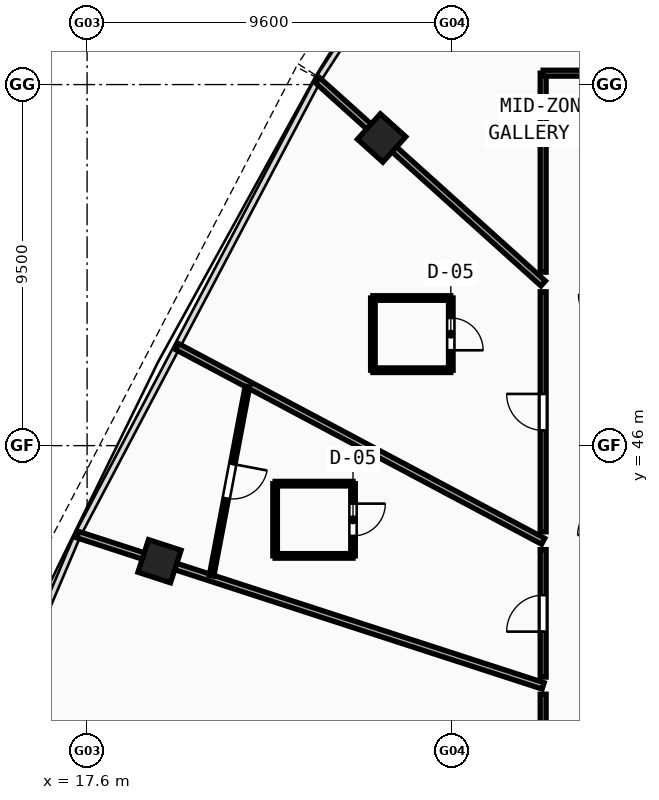
"""IFC4 building model, lengths in metres.
Left out: names, types, materials, properties, quantities, classifications, styles, units other than length and angle.
Written with IfcOpenShell. Run it as: python <this file> out.ifc"""

import sys

from ifc_helpers import new_model, si_unit, direction, frame, frame_2d, origin, origin_with_axes, origin_2d, place, context, subcontext, project, spatial, rectangle, hollow_rectangle, extrude, source, transform, mapped, element, fill, save


model = new_model("IFC4")
c1 = context("Model", 3, precision=1e-05, world=origin(), true_north=direction((0.0, 1.0)))
c2 = subcontext(c1, "Body", "Model", "MODEL_VIEW")
j1 = project(units=[si_unit("LENGTHUNIT", "METRE"), si_unit("PLANEANGLEUNIT", "RADIAN")], contexts=[c1])
p1 = place(None, origin())
s1 = spatial("IfcSite", under=j1, at=p1, CompositionType="ELEMENT")
p2 = place(p1, origin())
s2 = spatial("IfcBuilding", under=s1, at=p2, CompositionType="ELEMENT")
p3 = place(p2, frame((0.0, 0.0, 184.76)))
s3 = spatial("IfcBuildingStorey", under=s2, at=p3, CompositionType="ELEMENT", Elevation=184.76)
m1 = source(origin(), c2, "Body", "SweptSolid", [
    extrude(hollow_rectangle(XDim=0.9, YDim=0.9, WallThickness=0.036, at=origin_2d()), origin(), (0.0, 0.0, 1.0), 3.8),
])
for number, where, z_axis, x_axis in (
    (1, (25.349, 54.095, -0.26), (0.0, 0.0, 1.0), (-0.669, -0.743, 0.0)),
    (2, (19.505, 42.958, -0.26), (0.0, 0.0, 1.0), (-0.309, -0.951, 0.0)),
):
    element("IfcColumn", number, at=place(p3, frame(where, z_axis=z_axis, x_axis=x_axis)), inside=s3, PredefinedType="COLUMN", context=c2, shape_type="MappedRepresentation", body=[
        mapped(m1, transform((0.0, 0.0, 0.0), scale=1.0)),
    ])
p4 = place(p3, frame((29.6, 50.267, 0.0), z_axis=(0.0, 0.0, 1.0), x_axis=(-0.743139097079, 0.669136968335, 0.0)))
e3 = element("IfcWall", 3, at=p4, inside=s3, PredefinedType="PARTITIONING", context=c2, shape_type="SweptSolid", body=[
    extrude(rectangle(XDim=7.987, YDim=0.175, at=frame_2d((3.994, 0.0))), origin(), (0.0, 0.0, 1.0), 2.89),
])
p5 = place(p3, frame((29.6, 43.483, 0.0), z_axis=(0.0, 0.0, 1.0), x_axis=(-0.882940086537, 0.469485679853, 0.0)))
e4 = element("IfcWall", 4, at=p5, inside=s3, PredefinedType="PARTITIONING", context=c2, shape_type="SweptSolid", body=[
    extrude(rectangle(XDim=10.91, YDim=0.175, at=frame_2d((5.455, 0.0))), origin(), (0.0, 0.0, 1.0), 2.89),
])
p6 = place(p3, frame((29.6, 39.678, 0.0), z_axis=(0.0, 0.0, 1.0), x_axis=(-0.951054689993, 0.309022615097, 0.0)))
e5 = element("IfcWall", 5, at=p6, inside=s3, PredefinedType="PARTITIONING", context=c2, shape_type="SweptSolid", body=[
    extrude(rectangle(XDim=12.875, YDim=0.175, at=frame_2d((6.438, 0.0))), origin(), (0.0, 0.0, 1.0), 2.89),
])
p7 = place(p3, frame((29.6, 21.8, 0.0), z_axis=(0.0, 0.0, 1.0), x_axis=(0.0, 1.0, 0.0)))
e6 = element("IfcWall", 6, at=p7, inside=s3, PredefinedType="PARTITIONING", context=c2, shape_type="SweptSolid", body=[
    extrude(rectangle(XDim=17.659, YDim=0.155, at=frame_2d((8.829, 0.0))), origin(), (0.0, 0.0, 1.0), 2.89),
])
p8 = place(p7, frame((8.234, 0.0, 0.0)))
e7 = element("IfcOpeningElement", 7, at=p8, cuts=e6, PredefinedType="OPENING", context=c2, shape_type="SweptSolid", body=[
    extrude(rectangle(XDim=0.96, YDim=2.12, at=frame_2d((0.48, 1.06))), frame((0.0, 0.087, 0.0), z_axis=(0.0, -1.0, 0.0), x_axis=(1.0, 0.0, 0.0)), (0.0, 0.0, 1.0), 0.175),
])
p9 = place(p3, frame((29.6, 39.91, 0.0), z_axis=(0.0, 0.0, 1.0), x_axis=(0.0, 1.0, 0.0)))
e8 = element("IfcWall", 8, at=p9, inside=s3, PredefinedType="PARTITIONING", context=c2, shape_type="SweptSolid", body=[
    extrude(rectangle(XDim=3.354, YDim=0.155, at=frame_2d((1.677, 0.0))), origin(), (0.0, 0.0, 1.0), 3.54),
])
p10 = place(p9, frame((1.196, 0.0, 0.0)))
e9 = element("IfcOpeningElement", 9, at=p10, cuts=e8, PredefinedType="OPENING", context=c2, shape_type="SweptSolid", body=[
    extrude(rectangle(XDim=0.96, YDim=2.12, at=frame_2d((0.48, 1.06))), frame((0.0, 0.087, 0.0), z_axis=(0.0, -1.0, 0.0), x_axis=(1.0, 0.0, 0.0)), (0.0, 0.0, 1.0), 0.175),
])
p11 = place(p3, frame((29.6, 43.733, 0.0), z_axis=(0.0, 0.0, 1.0), x_axis=(0.0, 1.0, 0.0)))
e10 = element("IfcWall", 10, at=p11, inside=s3, PredefinedType="PARTITIONING", context=c2, shape_type="SweptSolid", body=[
    extrude(rectangle(XDim=6.315, YDim=0.155, at=frame_2d((3.157, 0.0))), origin(), (0.0, 0.0, 1.0), 2.89),
])
p12 = place(p11, frame((2.668, 0.0, 0.0)))
e11 = element("IfcOpeningElement", 11, at=p12, cuts=e10, PredefinedType="OPENING", context=c2, shape_type="SweptSolid", body=[
    extrude(rectangle(XDim=0.96, YDim=2.12, at=frame_2d((0.48, 1.06))), frame((0.0, 0.087, 0.0), z_axis=(0.0, -1.0, 0.0), x_axis=(1.0, 0.0, 0.0)), (0.0, 0.0, 1.0), 0.175),
])
p13 = place(p3, frame((29.6, 50.563, 0.0), z_axis=(0.0, 0.0, 1.0), x_axis=(0.0, 1.0, 0.0)))
e12 = element("IfcWall", 12, at=p13, inside=s3, PredefinedType="PARTITIONING", context=c2, shape_type="SweptSolid", body=[
    extrude(rectangle(XDim=5.237, YDim=0.155, at=frame_2d((2.618, 0.0))), origin(), (0.0, 0.0, 1.0), 3.54),
])
p14 = place(p3, frame((29.6, 55.8, 0.0), z_axis=(0.0, 0.0, 1.0), x_axis=(1.0, 0.0, 0.0)))
e13 = element("IfcWall", 13, at=p14, inside=s3, PredefinedType="PARTITIONING", context=c2, shape_type="SweptSolid", body=[
    extrude(rectangle(XDim=14.109, YDim=0.155, at=frame_2d((7.054, 0.0))), origin(), (0.0, 0.0, 1.0), 2.89),
])
p15 = place(p14, frame((6.385, 0.0, 0.0)))
e14 = element("IfcOpeningElement", 14, at=p15, cuts=e13, PredefinedType="OPENING", context=c2, shape_type="SweptSolid", body=[
    extrude(rectangle(XDim=0.96, YDim=2.12, at=frame_2d((0.48, 1.06))), frame((0.0, 0.087, 0.0), z_axis=(0.0, -1.0, 0.0), x_axis=(1.0, 0.0, 0.0)), (0.0, 0.0, 1.0), 0.175),
])
p16 = place(p3, frame((25.12, 47.984, 0.0), z_axis=(0.0, 0.0, 1.0), x_axis=(1.0, 0.0, 0.0)))
e15 = element("IfcWall", 15, at=p16, inside=s3, PredefinedType="PARTITIONING", context=c2, shape_type="SweptSolid", body=[
    extrude(rectangle(XDim=2.05, YDim=0.12, at=frame_2d((1.025, 0.0))), origin(), (0.0, 0.0, 1.0), 3.54),
])
p17 = place(p3, frame((27.17, 47.984, 0.0), z_axis=(0.0, 0.0, 1.0), x_axis=(0.0, 1.0, 0.0)))
e16 = element("IfcWall", 16, at=p17, inside=s3, PredefinedType="PARTITIONING", context=c2, shape_type="SweptSolid", body=[
    extrude(rectangle(XDim=1.9, YDim=0.12, at=frame_2d((0.95, 0.0))), origin(), (0.0, 0.0, 1.0), 3.54),
])
p18 = place(p17, frame((0.525, 0.0, 0.0)))
e17 = element("IfcOpeningElement", 17, at=p18, cuts=e16, PredefinedType="OPENING", context=c2, shape_type="SweptSolid", body=[
    extrude(rectangle(XDim=0.85, YDim=2.1, at=frame_2d((0.425, 1.05))), frame((0.0, 0.07, 0.0), z_axis=(0.0, -1.0, 0.0), x_axis=(1.0, 0.0, 0.0)), (0.0, 0.0, 1.0), 0.14),
])
p19 = place(p3, frame((27.17, 49.884, 0.0), z_axis=(0.0, 0.0, 1.0), x_axis=(-1.0, 0.0, 0.0)))
e18 = element("IfcWall", 18, at=p19, inside=s3, PredefinedType="PARTITIONING", context=c2, shape_type="SweptSolid", body=[
    extrude(rectangle(XDim=2.05, YDim=0.12, at=frame_2d((1.025, 0.0))), origin(), (0.0, 0.0, 1.0), 3.54),
])
p20 = place(p3, frame((25.12, 49.884, 0.0), z_axis=(0.0, 0.0, 1.0), x_axis=(0.0, -1.0, 0.0)))
e19 = element("IfcWall", 19, at=p20, inside=s3, PredefinedType="PARTITIONING", context=c2, shape_type="SweptSolid", body=[
    extrude(rectangle(XDim=1.9, YDim=0.12, at=frame_2d((0.95, 0.0))), origin(), (0.0, 0.0, 1.0), 3.54),
])
p21 = place(p3, frame((22.547, 43.099, 0.0), z_axis=(0.0, 0.0, 1.0), x_axis=(1.0, 0.0, 0.0)))
e20 = element("IfcWall", 20, at=p21, inside=s3, PredefinedType="PARTITIONING", context=c2, shape_type="SweptSolid", body=[
    extrude(rectangle(XDim=2.05, YDim=0.12, at=frame_2d((1.025, 0.0))), origin(), (0.0, 0.0, 1.0), 3.54),
])
p22 = place(p3, frame((24.597, 43.099, 0.0), z_axis=(0.0, 0.0, 1.0), x_axis=(0.0, 1.0, 0.0)))
e21 = element("IfcWall", 21, at=p22, inside=s3, PredefinedType="PARTITIONING", context=c2, shape_type="SweptSolid", body=[
    extrude(rectangle(XDim=1.9, YDim=0.12, at=frame_2d((0.95, 0.0))), origin(), (0.0, 0.0, 1.0), 3.54),
])
p23 = place(p22, frame((0.525, 0.0, 0.0)))
e22 = element("IfcOpeningElement", 22, at=p23, cuts=e21, PredefinedType="OPENING", context=c2, shape_type="SweptSolid", body=[
    extrude(rectangle(XDim=0.85, YDim=2.1, at=frame_2d((0.425, 1.05))), frame((0.0, 0.07, 0.0), z_axis=(0.0, -1.0, 0.0), x_axis=(1.0, 0.0, 0.0)), (0.0, 0.0, 1.0), 0.14),
])
p24 = place(p3, frame((24.597, 44.999, 0.0), z_axis=(0.0, 0.0, 1.0), x_axis=(-1.0, 0.0, 0.0)))
e23 = element("IfcWall", 23, at=p24, inside=s3, PredefinedType="PARTITIONING", context=c2, shape_type="SweptSolid", body=[
    extrude(rectangle(XDim=2.05, YDim=0.12, at=frame_2d((1.025, 0.0))), origin(), (0.0, 0.0, 1.0), 3.54),
])
p25 = place(p3, frame((22.547, 44.999, 0.0), z_axis=(0.0, 0.0, 1.0), x_axis=(0.0, -1.0, 0.0)))
e24 = element("IfcWall", 24, at=p25, inside=s3, PredefinedType="PARTITIONING", context=c2, shape_type="SweptSolid", body=[
    extrude(rectangle(XDim=1.9, YDim=0.12, at=frame_2d((0.95, 0.0))), origin(), (0.0, 0.0, 1.0), 3.54),
])
p26 = place(p3, frame((21.818, 47.553, 0.0), z_axis=(0.0, 0.0, 1.0), x_axis=(-0.186234987185, -0.982505231308, 0.0)))
e25 = element("IfcWall", 25, at=p26, inside=s3, PredefinedType="PARTITIONING", context=c2, shape_type="SweptSolid", body=[
    extrude(rectangle(XDim=5.065, YDim=0.12, at=frame_2d((2.533, 0.0))), origin(), (0.0, 0.0, 1.0), 2.89),
])
p27 = place(p26, frame((2.073, 0.0, 0.0)))
e26 = element("IfcOpeningElement", 26, at=p27, cuts=e25, PredefinedType="OPENING", context=c2, shape_type="SweptSolid", body=[
    extrude(rectangle(XDim=0.92, YDim=2.1, at=frame_2d((0.46, 1.05))), frame((0.0, 0.07, 0.0), z_axis=(0.0, -1.0, 0.0), x_axis=(1.0, 0.0, 0.0)), (0.0, 0.0, 1.0), 0.14),
])
m2 = source(origin(), c2, "Body", "SweptSolid", [
    extrude(rectangle(XDim=0.96, YDim=2.12, at=frame_2d((0.48, 1.06))), frame((0.0, 0.025, 0.0), z_axis=(0.0, -1.0, 0.0), x_axis=(1.0, 0.0, 0.0)), (0.0, 0.0, 1.0), 0.05),
])
p28 = place(p12, origin_with_axes())
e27 = element("IfcDoor", 27, at=p28, inside=s3, OperationType="SINGLE_SWING_RIGHT", PredefinedType="DOOR", context=c2, shape_type="MappedRepresentation", body=[
    mapped(m2, transform((0.0, 0.0, 0.0), scale=1.0)),
])
fill(e11, e27)
m3 = source(origin(), c2, "Body", "SweptSolid", [
    extrude(rectangle(XDim=0.85, YDim=2.1, at=frame_2d((0.425, 1.05))), frame((0.0, 0.025, 0.0), z_axis=(0.0, -1.0, 0.0), x_axis=(1.0, 0.0, 0.0)), (0.0, 0.0, 1.0), 0.05),
])
p29 = place(p18, frame((0.85, 0.0, 0.0), z_axis=(0.0, 0.0, 1.0), x_axis=(-1.0, 0.0, 0.0)))
e28 = element("IfcDoor", 28, at=p29, inside=s3, OperationType="SINGLE_SWING_RIGHT", PredefinedType="DOOR", context=c2, shape_type="MappedRepresentation", body=[
    mapped(m3, transform((0.0, 0.0, 0.0), scale=1.0)),
])
fill(e17, e28)
p30 = place(p10, origin_with_axes())
e29 = element("IfcDoor", 29, at=p30, inside=s3, OperationType="SINGLE_SWING_LEFT", PredefinedType="DOOR", context=c2, shape_type="MappedRepresentation", body=[
    mapped(m2, transform((0.0, 0.0, 0.0), scale=1.0)),
])
fill(e9, e29)
p31 = place(p23, frame((0.85, 0.0, 0.0), z_axis=(0.0, 0.0, 1.0), x_axis=(-1.0, 0.0, 0.0)))
e30 = element("IfcDoor", 30, at=p31, inside=s3, OperationType="SINGLE_SWING_LEFT", PredefinedType="DOOR", context=c2, shape_type="MappedRepresentation", body=[
    mapped(m3, transform((0.0, 0.0, 0.0), scale=1.0)),
])
fill(e22, e30)
m4 = source(origin(), c2, "Body", "SweptSolid", [
    extrude(rectangle(XDim=0.92, YDim=2.1, at=frame_2d((0.46, 1.05))), frame((0.0, 0.025, 0.0), z_axis=(0.0, -1.0, 0.0), x_axis=(1.0, 0.0, 0.0)), (0.0, 0.0, 1.0), 0.05),
])
p32 = place(p27, origin_with_axes())
e31 = element("IfcDoor", 31, at=p32, inside=s3, OperationType="SINGLE_SWING_LEFT", PredefinedType="DOOR", context=c2, shape_type="MappedRepresentation", body=[
    mapped(m4, transform((0.0, 0.0, 0.0), scale=1.0)),
])
fill(e26, e31)
save(model, sys.argv[1])
